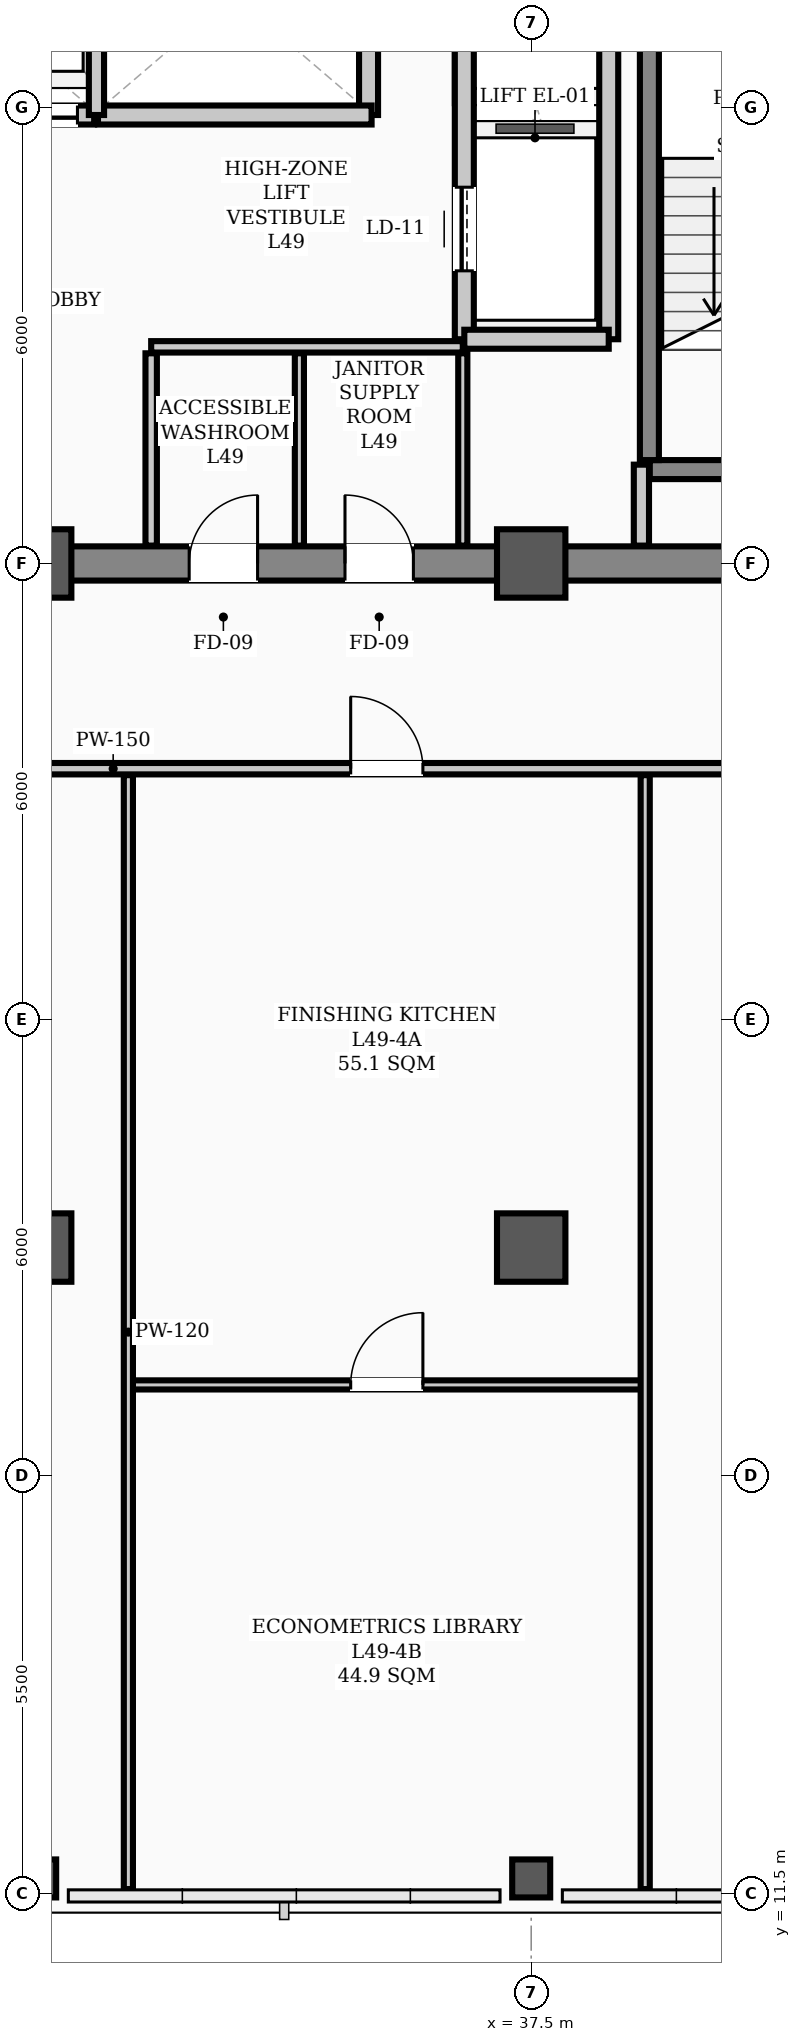
"""IFC4 building model, lengths in metres.
Left out: names, types, materials, properties, quantities, classifications, styles, units other than length and angle.
Written with IfcOpenShell. Run it as: python <this file> out.ifc"""

import sys

from ifc_helpers import new_model, si_unit, direction, frame, frame_2d, origin, origin_2d, place, context, subcontext, project, spatial, rectangle, hollow_rectangle, extrude, element, fill, save


model = new_model("IFC4")
c1 = context("Model", 3, precision=1e-05, world=origin(), true_north=direction((0.0, 1.0)))
c2 = subcontext(c1, "Body", "Model", "MODEL_VIEW")
j1 = project(units=[si_unit("LENGTHUNIT", "METRE"), si_unit("PLANEANGLEUNIT", "RADIAN")], contexts=[c1])
p1 = place(None, origin())
s1 = spatial("IfcSite", under=j1, at=p1, CompositionType="ELEMENT")
p2 = place(p1, origin())
s2 = spatial("IfcBuilding", under=s1, at=p2, CompositionType="ELEMENT")
p3 = place(p2, frame((0.0, 0.0, 196.8)))
s3 = spatial("IfcBuildingStorey", under=s2, at=p3, CompositionType="ELEMENT", Elevation=196.8)
for number, where, z_axis, x_axis in (
    (1, (31.0, 29.0, 0.0), (0.0, 0.0, 1.0), (1.0, 0.0, 0.0)),
    (2, (37.5, 29.0, 0.0), (0.0, 0.0, 1.0), (1.0, 0.0, 0.0)),
    (3, (31.0, 20.0, 0.0), (0.0, 0.0, 1.0), (1.0, 0.0, 0.0)),
    (4, (37.5, 20.0, 0.0), (0.0, 0.0, 1.0), (1.0, 0.0, 0.0)),
):
    element("IfcColumn", number, at=place(p3, frame(where, z_axis=z_axis, x_axis=x_axis)), inside=s3, PredefinedType="COLUMN", context=c2, shape_type="SweptSolid", body=[
        extrude(hollow_rectangle(XDim=0.9, YDim=0.9, WallThickness=0.035, InnerFilletRadius=0.017, OuterFilletRadius=0.052, at=origin_2d()), origin(), (0.0, 0.0, 1.0), 3.9),
    ])
for number, where, z_axis, x_axis in (
    (5, (31.0, 11.7, 0.0), (0.0, 0.0, 1.0), (1.0, 0.0, 0.0)),
    (6, (37.5, 11.7, 0.0), (0.0, 0.0, 1.0), (1.0, 0.0, 0.0)),
):
    element("IfcColumn", number, at=place(p3, frame(where, z_axis=z_axis, x_axis=x_axis)), inside=s3, PredefinedType="COLUMN", context=c2, shape_type="SweptSolid", body=[
        extrude(hollow_rectangle(XDim=0.5, YDim=0.5, WallThickness=0.024, InnerFilletRadius=0.012, OuterFilletRadius=0.036, at=origin_2d()), origin(), (0.0, 0.0, 1.0), 3.9),
    ])
p4 = place(p3, frame((13.5, 29.0, 0.0), z_axis=(0.0, 0.0, 1.0), x_axis=(1.0, 0.0, 0.0)))
e7 = element("IfcWall", 7, at=p4, inside=s3, PredefinedType="SHEAR", context=c2, shape_type="SweptSolid", body=[
    extrude(rectangle(XDim=30.5, YDim=0.45, at=frame_2d((15.25, 0.0))), origin(), (0.0, 0.0, 1.0), 3.6),
])
p5 = place(p4, frame((1.75, 0.0, 0.0)))
e8 = element("IfcOpeningElement", 8, at=p5, cuts=e7, PredefinedType="OPENING", context=c2, shape_type="SweptSolid", body=[
    extrude(rectangle(XDim=1.1, YDim=2.08, at=frame_2d((0.55, 1.04))), frame((0.0, 0.235, 0.0), z_axis=(0.0, -1.0, 0.0), x_axis=(1.0, 0.0, 0.0)), (0.0, 0.0, 1.0), 0.47),
])
p6 = place(p4, frame((26.7, 0.0, 0.0)))
e9 = element("IfcOpeningElement", 9, at=p6, cuts=e7, PredefinedType="OPENING", context=c2, shape_type="SweptSolid", body=[
    extrude(rectangle(XDim=1.1, YDim=2.08, at=frame_2d((0.55, 1.04))), frame((0.0, 0.235, 0.0), z_axis=(0.0, -1.0, 0.0), x_axis=(1.0, 0.0, 0.0)), (0.0, 0.0, 1.0), 0.47),
])
p7 = place(p4, frame((6.8, 0.0, 0.0)))
e10 = element("IfcOpeningElement", 10, at=p7, cuts=e7, PredefinedType="OPENING", context=c2, shape_type="SweptSolid", body=[
    extrude(rectangle(XDim=1.1, YDim=2.08, at=frame_2d((0.55, 1.04))), frame((0.0, 0.235, 0.0), z_axis=(0.0, -1.0, 0.0), x_axis=(1.0, 0.0, 0.0)), (0.0, 0.0, 1.0), 0.47),
])
p8 = place(p4, frame((13.2, 0.0, 0.0)))
e11 = element("IfcOpeningElement", 11, at=p8, cuts=e7, PredefinedType="OPENING", context=c2, shape_type="SweptSolid", body=[
    extrude(rectangle(XDim=1.6, YDim=2.08, at=frame_2d((0.8, 1.04))), frame((0.0, 0.235, 0.0), z_axis=(0.0, -1.0, 0.0), x_axis=(1.0, 0.0, 0.0)), (0.0, 0.0, 1.0), 0.47),
])
p9 = place(p4, frame((19.5, 0.0, 0.0)))
e12 = element("IfcOpeningElement", 12, at=p9, cuts=e7, PredefinedType="OPENING", context=c2, shape_type="SweptSolid", body=[
    extrude(rectangle(XDim=0.9, YDim=2.08, at=frame_2d((0.45, 1.04))), frame((0.0, 0.235, 0.0), z_axis=(0.0, -1.0, 0.0), x_axis=(1.0, 0.0, 0.0)), (0.0, 0.0, 1.0), 0.47),
])
p10 = place(p4, frame((21.55, 0.0, 0.0)))
e13 = element("IfcOpeningElement", 13, at=p10, cuts=e7, PredefinedType="OPENING", context=c2, shape_type="SweptSolid", body=[
    extrude(rectangle(XDim=0.9, YDim=2.08, at=frame_2d((0.45, 1.04))), frame((0.0, 0.235, 0.0), z_axis=(0.0, -1.0, 0.0), x_axis=(1.0, 0.0, 0.0)), (0.0, 0.0, 1.0), 0.47),
])
p11 = place(p3, frame((39.06, 30.235, 0.0), z_axis=(0.0, 0.0, 1.0), x_axis=(1.0, 0.0, 0.0)))
e14 = element("IfcWall", 14, at=p11, inside=s3, PredefinedType="STANDARD", context=c2, shape_type="SweptSolid", body=[
    extrude(rectangle(XDim=3.34, YDim=0.25, at=frame_2d((1.67, 0.0))), origin(), (0.0, 0.0, 1.0), 3.6),
])
p12 = place(p11, frame((1.1, 0.0, 0.0)))
e15 = element("IfcOpeningElement", 15, at=p12, cuts=e14, PredefinedType="OPENING", context=c2, shape_type="SweptSolid", body=[
    extrude(rectangle(XDim=1.1, YDim=2.08, at=frame_2d((0.55, 1.04))), frame((0.0, 0.135, 0.0), z_axis=(0.0, -1.0, 0.0), x_axis=(1.0, 0.0, 0.0)), (0.0, 0.0, 1.0), 0.27),
])
p13 = place(p3, frame((39.055, 30.36, 0.0), z_axis=(0.0, 0.0, 1.0), x_axis=(0.0, 1.0, 0.0)))
e16 = element("IfcWall", 16, at=p13, inside=s3, PredefinedType="STANDARD", context=c2, shape_type="SweptSolid", body=[
    extrude(rectangle(XDim=7.184, YDim=0.25, at=frame_2d((3.592, 0.0))), origin(), (0.0, 0.0, 1.0), 3.6),
])
p14 = place(p3, frame((36.62, 31.95, 0.0), z_axis=(0.0, 0.0, 1.0), x_axis=(0.0, 1.0, 0.0)))
e17 = element("IfcWall", 17, at=p14, inside=s3, PredefinedType="STANDARD", context=c2, shape_type="SweptSolid", body=[
    extrude(rectangle(XDim=6.0, YDim=0.25, at=frame_2d((3.0, 0.0))), origin(), (0.0, 0.0, 1.0), 2.18),
])
p15 = place(p14, frame((0.9, 0.0, 0.0)))
e18 = element("IfcOpeningElement", 18, at=p15, cuts=e17, PredefinedType="OPENING", context=c2, shape_type="SweptSolid", body=[
    extrude(rectangle(XDim=1.1, YDim=2.08, at=frame_2d((0.55, 1.04))), frame((0.0, 0.135, 0.0), z_axis=(0.0, -1.0, 0.0), x_axis=(1.0, 0.0, 0.0)), (0.0, 0.0, 1.0), 0.27),
])
p16 = place(p14, frame((4.0, 0.0, 0.0)))
e19 = element("IfcOpeningElement", 19, at=p16, cuts=e17, PredefinedType="OPENING", context=c2, shape_type="SweptSolid", body=[
    extrude(rectangle(XDim=1.1, YDim=2.08, at=frame_2d((0.55, 1.04))), frame((0.0, 0.135, 0.0), z_axis=(0.0, -1.0, 0.0), x_axis=(1.0, 0.0, 0.0)), (0.0, 0.0, 1.0), 0.27),
])
p17 = place(p3, frame((38.52, 31.95, 0.0), z_axis=(0.0, 0.0, 1.0), x_axis=(0.0, 1.0, 0.0)))
e20 = element("IfcWall", 20, at=p17, inside=s3, PredefinedType="STANDARD", context=c2, shape_type="SweptSolid", body=[
    extrude(rectangle(XDim=6.0, YDim=0.25, at=frame_2d((3.0, 0.0))), origin(), (0.0, 0.0, 1.0), 2.18),
])
p18 = place(p3, frame((36.62, 31.95, 0.0), z_axis=(0.0, 0.0, 1.0), x_axis=(1.0, 0.0, 0.0)))
e21 = element("IfcWall", 21, at=p18, inside=s3, PredefinedType="STANDARD", context=c2, shape_type="SweptSolid", body=[
    extrude(rectangle(XDim=1.9, YDim=0.25, at=frame_2d((0.95, 0.0))), origin(), (0.0, 0.0, 1.0), 3.48),
])
p19 = place(p3, frame((35.36, 34.9, 0.0), z_axis=(0.0, 0.0, 1.0), x_axis=(0.0, 1.0, 0.0)))
e22 = element("IfcWall", 22, at=p19, inside=s3, PredefinedType="STANDARD", context=c2, shape_type="SweptSolid", body=[
    extrude(rectangle(XDim=3.05, YDim=0.25, at=frame_2d((1.525, 0.0))), origin(), (0.0, 0.0, 1.0), 2.18),
])
p20 = place(p3, frame((28.2, 34.9, 0.0), z_axis=(0.0, 0.0, 1.0), x_axis=(1.0, 0.0, 0.0)))
e23 = element("IfcWall", 23, at=p20, inside=s3, PredefinedType="STANDARD", context=c2, shape_type="SweptSolid", body=[
    extrude(rectangle(XDim=3.55, YDim=0.25, at=frame_2d((1.775, 0.0))), origin(), (0.0, 0.0, 1.0), 3.6),
])
p21 = place(p20, frame((0.23, 0.0, 0.0)))
e24 = element("IfcOpeningElement", 24, at=p21, cuts=e23, PredefinedType="OPENING", context=c2, shape_type="SweptSolid", body=[
    extrude(rectangle(XDim=1.3, YDim=2.08, at=frame_2d((0.65, 1.04))), frame((0.0, 0.135, 0.0), z_axis=(0.0, -1.0, 0.0), x_axis=(1.0, 0.0, 0.0)), (0.0, 0.0, 1.0), 0.27),
])
p22 = place(p20, frame((2.03, 0.0, 0.0)))
e25 = element("IfcOpeningElement", 25, at=p22, cuts=e23, PredefinedType="OPENING", context=c2, shape_type="SweptSolid", body=[
    extrude(rectangle(XDim=1.3, YDim=2.08, at=frame_2d((0.65, 1.04))), frame((0.0, 0.135, 0.0), z_axis=(0.0, -1.0, 0.0), x_axis=(1.0, 0.0, 0.0)), (0.0, 0.0, 1.0), 0.27),
])
p23 = place(p3, frame((31.8, 34.9, 0.0), z_axis=(0.0, 0.0, 1.0), x_axis=(1.0, 0.0, 0.0)))
e26 = element("IfcWall", 26, at=p23, inside=s3, PredefinedType="STANDARD", context=c2, shape_type="SweptSolid", body=[
    extrude(rectangle(XDim=3.6, YDim=0.25, at=frame_2d((1.8, 0.0))), origin(), (0.0, 0.0, 1.0), 3.6),
])
p24 = place(p3, frame((32.5, 31.85, 0.0), z_axis=(0.0, 0.0, 1.0), x_axis=(1.0, 0.0, 0.0)))
e27 = element("IfcWall", 27, at=p24, inside=s3, PredefinedType="PARTITIONING", context=c2, shape_type="SweptSolid", body=[
    extrude(rectangle(XDim=4.1, YDim=0.15, at=frame_2d((2.05, 0.0))), origin(), (0.0, 0.0, 1.0), 3.6),
])
p25 = place(p3, frame((10.31, 26.3, 0.0), z_axis=(0.0, 0.0, 1.0), x_axis=(1.0, 0.0, 0.0)))
e28 = element("IfcWall", 28, at=p25, inside=s3, PredefinedType="PARTITIONING", context=c2, shape_type="SweptSolid", body=[
    extrude(rectangle(XDim=43.38, YDim=0.15, at=frame_2d((21.69, 0.0))), origin(), (0.0, 0.0, 1.0), 2.18),
])
p26 = place(p25, frame((4.47, 0.0, 0.0)))
e29 = element("IfcOpeningElement", 29, at=p26, cuts=e28, PredefinedType="OPENING", context=c2, shape_type="SweptSolid", body=[
    extrude(rectangle(XDim=0.95, YDim=2.08, at=frame_2d((0.475, 1.04))), frame((0.0, 0.085, 0.0), z_axis=(0.0, -1.0, 0.0), x_axis=(1.0, 0.0, 0.0)), (0.0, 0.0, 1.0), 0.17),
])
p27 = place(p25, frame((10.815, 0.0, 0.0)))
e30 = element("IfcOpeningElement", 30, at=p27, cuts=e28, PredefinedType="OPENING", context=c2, shape_type="SweptSolid", body=[
    extrude(rectangle(XDim=0.95, YDim=2.08, at=frame_2d((0.475, 1.04))), frame((0.0, 0.085, 0.0), z_axis=(0.0, -1.0, 0.0), x_axis=(1.0, 0.0, 0.0)), (0.0, 0.0, 1.0), 0.17),
])
p28 = place(p25, frame((17.715, 0.0, 0.0)))
e31 = element("IfcOpeningElement", 31, at=p28, cuts=e28, PredefinedType="OPENING", context=c2, shape_type="SweptSolid", body=[
    extrude(rectangle(XDim=0.95, YDim=2.08, at=frame_2d((0.475, 1.04))), frame((0.0, 0.085, 0.0), z_axis=(0.0, -1.0, 0.0), x_axis=(1.0, 0.0, 0.0)), (0.0, 0.0, 1.0), 0.17),
])
p29 = place(p25, frame((24.815, 0.0, 0.0)))
e32 = element("IfcOpeningElement", 32, at=p29, cuts=e28, PredefinedType="OPENING", context=c2, shape_type="SweptSolid", body=[
    extrude(rectangle(XDim=0.95, YDim=2.08, at=frame_2d((0.475, 1.04))), frame((0.0, 0.085, 0.0), z_axis=(0.0, -1.0, 0.0), x_axis=(1.0, 0.0, 0.0)), (0.0, 0.0, 1.0), 0.17),
])
p30 = place(p25, frame((31.415, 0.0, 0.0)))
e33 = element("IfcOpeningElement", 33, at=p30, cuts=e28, PredefinedType="OPENING", context=c2, shape_type="SweptSolid", body=[
    extrude(rectangle(XDim=0.95, YDim=2.08, at=frame_2d((0.475, 1.04))), frame((0.0, 0.085, 0.0), z_axis=(0.0, -1.0, 0.0), x_axis=(1.0, 0.0, 0.0)), (0.0, 0.0, 1.0), 0.17),
])
p31 = place(p3, frame((32.2, 18.193, 0.0), z_axis=(0.0, 0.0, 1.0), x_axis=(1.0, 0.0, 0.0)))
e34 = element("IfcWall", 34, at=p31, inside=s3, PredefinedType="PARTITIONING", context=c2, shape_type="SweptSolid", body=[
    extrude(rectangle(XDim=6.8, YDim=0.12, at=frame_2d((3.4, 0.0))), origin(), (0.0, 0.0, 1.0), 2.18),
])
p32 = place(p31, frame((2.925, 0.0, 0.0)))
e35 = element("IfcOpeningElement", 35, at=p32, cuts=e34, PredefinedType="OPENING", context=c2, shape_type="SweptSolid", body=[
    extrude(rectangle(XDim=0.95, YDim=2.08, at=frame_2d((0.475, 1.04))), frame((0.0, 0.07, 0.0), z_axis=(0.0, -1.0, 0.0), x_axis=(1.0, 0.0, 0.0)), (0.0, 0.0, 1.0), 0.14),
])
p33 = place(p3, frame((38.95, 29.235, 0.0), z_axis=(0.0, 0.0, 1.0), x_axis=(0.0, 1.0, 0.0)))
e36 = element("IfcWall", 36, at=p33, inside=s3, PredefinedType="STANDARD", context=c2, shape_type="SweptSolid", body=[
    extrude(rectangle(XDim=1.065, YDim=0.2, at=frame_2d((0.532, 0.0))), origin(), (0.0, 0.0, 1.0), 2.18),
])
p34 = place(p3, frame((32.5, 29.235, 0.0), z_axis=(0.0, 0.0, 1.0), x_axis=(0.0, 1.0, 0.0)))
e37 = element("IfcWall", 37, at=p34, inside=s3, PredefinedType="PARTITIONING", context=c2, shape_type="SweptSolid", body=[
    extrude(rectangle(XDim=2.53, YDim=0.15, at=frame_2d((1.265, 0.0))), origin(), (0.0, 0.0, 1.0), 2.18),
])
for number, where, z_axis, x_axis in (
    (38, (36.6, 29.235, 0.0), (0.0, 0.0, 1.0), (0.0, 1.0, 0.0)),
    (39, (34.45, 29.235, 0.0), (0.0, 0.0, 1.0), (0.0, 1.0, 0.0)),
):
    element("IfcWall", number, at=place(p3, frame(where, z_axis=z_axis, x_axis=x_axis)), inside=s3, PredefinedType="PARTITIONING", context=c2, shape_type="SweptSolid", body=[
        extrude(rectangle(XDim=2.53, YDim=0.12, at=frame_2d((1.265, 0.0))), origin(), (0.0, 0.0, 1.0), 2.18),
    ])
for number, where, z_axis, x_axis in (
    (40, (32.2, 11.56, 0.0), (0.0, 0.0, 1.0), (0.0, 1.0, 0.0)),
    (41, (39.0, 11.56, 0.0), (0.0, 0.0, 1.0), (0.0, 1.0, 0.0)),
):
    element("IfcWall", number, at=place(p3, frame(where, z_axis=z_axis, x_axis=x_axis)), inside=s3, PredefinedType="PARTITIONING", context=c2, shape_type="SweptSolid", body=[
        extrude(rectangle(XDim=14.655, YDim=0.12, at=frame_2d((7.328, 0.0))), origin(), (0.0, 0.0, 1.0), 2.18),
    ])
p35 = place(p3, frame((31.78, 34.9, 0.0), z_axis=(0.0, 0.0, 1.0), x_axis=(0.0, 1.0, 0.0)))
e42 = element("IfcWall", 42, at=p35, inside=s3, PredefinedType="STANDARD", context=c2, shape_type="SweptSolid", body=[
    extrude(rectangle(XDim=3.12, YDim=0.2, at=frame_2d((1.56, 0.0))), origin(), (0.0, 0.0, 1.0), 2.18),
])
p36 = place(p9, origin())
e43 = element("IfcDoor", 43, at=p36, inside=s3, OperationType="SINGLE_SWING_RIGHT", PredefinedType="DOOR", context=c2, shape_type="SweptSolid", body=[
    extrude(rectangle(XDim=0.9, YDim=2.08, at=frame_2d((0.45, 1.04))), frame((0.0, 0.025, 0.0), z_axis=(0.0, -1.0, 0.0), x_axis=(1.0, 0.0, 0.0)), (0.0, 0.0, 1.0), 0.05),
])
fill(e12, e43)
p37 = place(p10, origin())
e44 = element("IfcDoor", 44, at=p37, inside=s3, OperationType="SINGLE_SWING_LEFT", PredefinedType="DOOR", context=c2, shape_type="SweptSolid", body=[
    extrude(rectangle(XDim=0.9, YDim=2.08, at=frame_2d((0.45, 1.04))), frame((0.0, 0.025, 0.0), z_axis=(0.0, -1.0, 0.0), x_axis=(1.0, 0.0, 0.0)), (0.0, 0.0, 1.0), 0.05),
])
fill(e13, e44)
p38 = place(p32, origin())
e45 = element("IfcDoor", 45, at=p38, inside=s3, OperationType="SINGLE_SWING_RIGHT", PredefinedType="DOOR", context=c2, shape_type="SweptSolid", body=[
    extrude(rectangle(XDim=0.95, YDim=2.08, at=frame_2d((0.475, 1.04))), frame((0.0, 0.025, 0.0), z_axis=(0.0, -1.0, 0.0), x_axis=(1.0, 0.0, 0.0)), (0.0, 0.0, 1.0), 0.05),
])
fill(e35, e45)
p39 = place(p29, origin())
e46 = element("IfcDoor", 46, at=p39, inside=s3, OperationType="SINGLE_SWING_LEFT", PredefinedType="DOOR", context=c2, shape_type="SweptSolid", body=[
    extrude(rectangle(XDim=0.95, YDim=2.08, at=frame_2d((0.475, 1.04))), frame((0.0, 0.025, 0.0), z_axis=(0.0, -1.0, 0.0), x_axis=(1.0, 0.0, 0.0)), (0.0, 0.0, 1.0), 0.05),
])
fill(e32, e46)
p40 = place(p15, origin())
e47 = element("IfcDoor", 47, at=p40, inside=s3, OperationType="SLIDING_TO_LEFT", PredefinedType="DOOR", context=c2, shape_type="SweptSolid", body=[
    extrude(rectangle(XDim=1.1, YDim=2.08, at=frame_2d((0.55, 1.04))), frame((0.0, 0.025, 0.0), z_axis=(0.0, -1.0, 0.0), x_axis=(1.0, 0.0, 0.0)), (0.0, 0.0, 1.0), 0.05),
])
fill(e18, e47)
p41 = place(p22, origin())
e48 = element("IfcDoor", 48, at=p41, inside=s3, OperationType="DOUBLE_DOOR_SLIDING", PredefinedType="DOOR", context=c2, shape_type="SweptSolid", body=[
    extrude(rectangle(XDim=1.3, YDim=2.08, at=frame_2d((0.65, 1.04))), frame((0.0, 0.025, 0.0), z_axis=(0.0, -1.0, 0.0), x_axis=(1.0, 0.0, 0.0)), (0.0, 0.0, 1.0), 0.05),
])
fill(e25, e48)
save(model, sys.argv[1])
